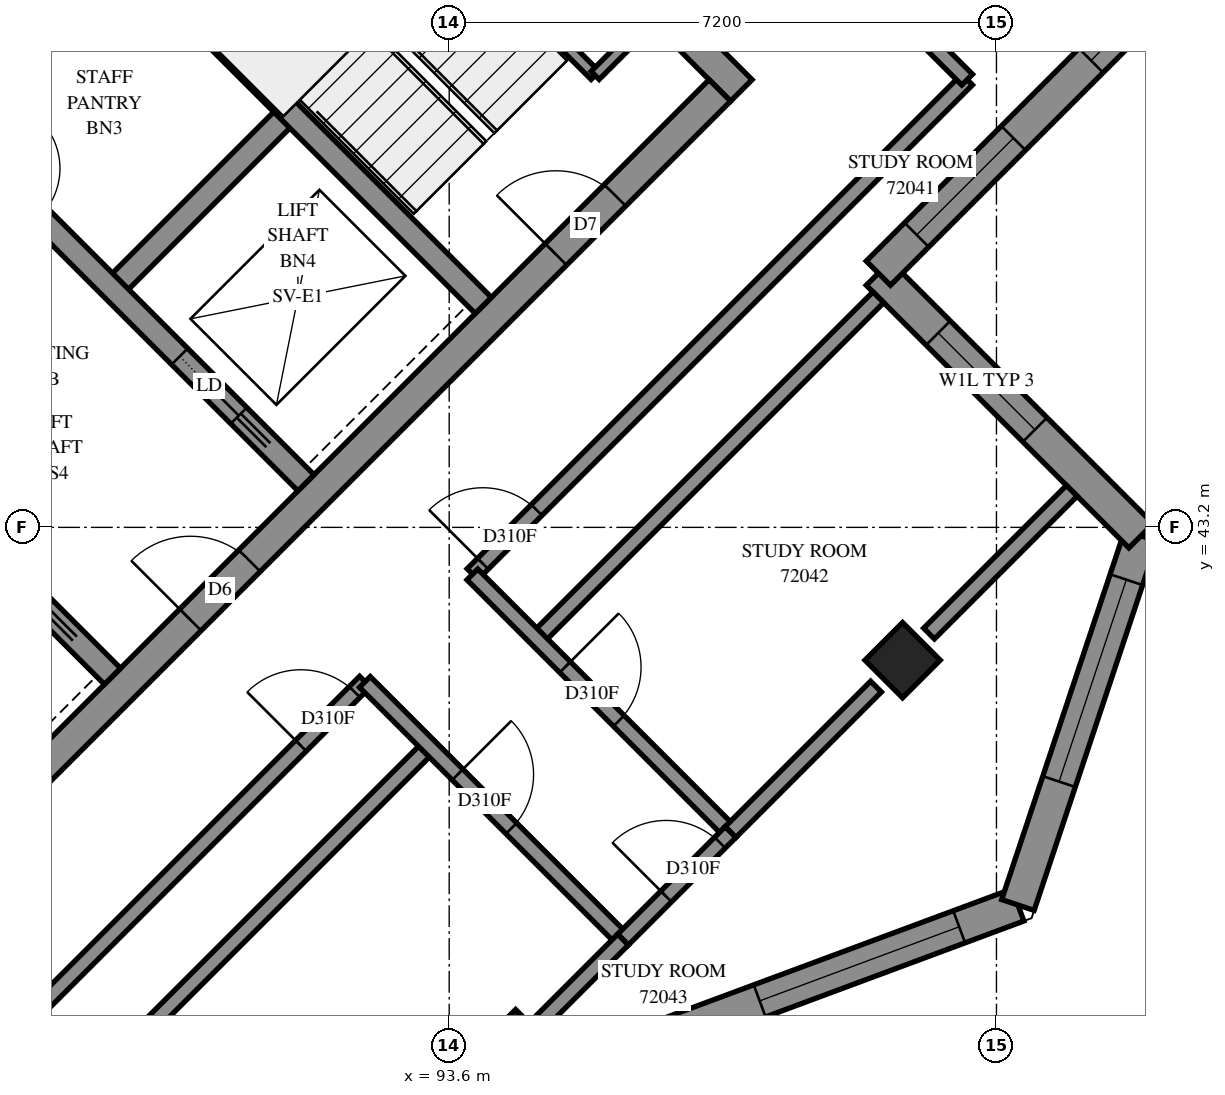
"""IFC4 building model, lengths in metres.
Left out: names, types, materials, properties, quantities, classifications, styles, units other than length and angle.
Written with IfcOpenShell. Run it as: python <this file> out.ifc"""

import sys

from ifc_helpers import new_model, si_unit, direction, frame, frame_2d, origin, origin_2d, place, context, subcontext, project, spatial, polyline, rectangle, outline, extrude, element, fill, save


model = new_model("IFC4")
c1 = context("Model", 3, precision=1e-05, world=origin(), true_north=direction((0.0, 1.0)))
c2 = subcontext(c1, "Body", "Model", "MODEL_VIEW")
j1 = project(units=[si_unit("LENGTHUNIT", "METRE"), si_unit("PLANEANGLEUNIT", "RADIAN")], contexts=[c1])
p1 = place(None, origin())
s1 = spatial("IfcSite", under=j1, at=p1, CompositionType="ELEMENT")
p2 = place(p1, origin())
s2 = spatial("IfcBuilding", under=s1, at=p2, CompositionType="ELEMENT")
p3 = place(p2, frame((0.0, 0.0, 264.2)))
s3 = spatial("IfcBuildingStorey", under=s2, at=p3, CompositionType="ELEMENT", Elevation=264.2)
for number, where, z_axis, x_axis in (
    (1, (99.565, 41.453, 0.0), (0.0, 0.0, 1.0), (0.707, -0.707, 0.0)),
    (2, (94.474, 36.362, 0.0), (0.0, 0.0, 1.0), (0.707, -0.707, 0.0)),
):
    element("IfcColumn", number, at=place(p3, frame(where, z_axis=z_axis, x_axis=x_axis)), inside=s3, PredefinedType="COLUMN", context=c2, shape_type="SweptSolid", body=[
        extrude(rectangle(XDim=0.7, YDim=0.7, at=origin_2d()), origin(), (0.0, 0.0, 1.0), 3.1),
    ])
p4 = place(p3, frame((86.695, 59.696, -0.3), z_axis=(0.0, 0.0, 1.0), x_axis=(0.7071100706, -0.7071034917, 0.0)))
e3 = element("IfcWall", 3, at=p4, inside=s3, PredefinedType="SHEAR", context=c2, shape_type="SweptSolid", body=[
    extrude(rectangle(XDim=15.2, YDim=0.4, at=frame_2d((7.6, 0.0))), origin(), (0.0, 0.0, 1.0), 2.7),
])
p5 = place(p4, frame((10.4, 0.0, 0.3)))
e4 = element("IfcOpeningElement", 4, at=p5, cuts=e3, PredefinedType="OPENING", context=c2, shape_type="SweptSolid", body=[
    extrude(rectangle(XDim=0.8, YDim=2.1, at=frame_2d((0.4, 1.05))), frame((0.0, 0.21, 0.0), z_axis=(0.0, -1.0, 0.0), x_axis=(1.0, 0.0, 0.0)), (0.0, 0.0, 1.0), 0.42),
])
p6 = place(p3, frame((86.978, 38.766, -0.3), z_axis=(0.0, 0.0, 1.0), x_axis=(0.7071067812, 0.7071067812, 0.0)))
e5 = element("IfcWall", 5, at=p6, inside=s3, PredefinedType="SHEAR", context=c2, shape_type="SweptSolid", body=[
    extrude(rectangle(XDim=14.4, YDim=0.4, at=frame_2d((7.2, 0.0))), origin(), (0.0, 0.0, 1.0), 2.7),
])
p7 = place(p6, frame((4.55, 0.0, 0.3)))
e6 = element("IfcOpeningElement", 6, at=p7, cuts=e5, PredefinedType="OPENING", context=c2, shape_type="SweptSolid", body=[
    extrude(rectangle(XDim=1.1, YDim=2.1, at=frame_2d((0.55, 1.05))), frame((0.0, 0.21, 0.0), z_axis=(0.0, -1.0, 0.0), x_axis=(1.0, 0.0, 0.0)), (0.0, 0.0, 1.0), 0.42),
])
p8 = place(p6, frame((11.35, 0.0, 0.3)))
e7 = element("IfcOpeningElement", 7, at=p8, cuts=e5, PredefinedType="OPENING", context=c2, shape_type="SweptSolid", body=[
    extrude(rectangle(XDim=1.1, YDim=2.1, at=frame_2d((0.55, 1.05))), frame((0.0, 0.21, 0.0), z_axis=(0.0, -1.0, 0.0), x_axis=(1.0, 0.0, 0.0)), (0.0, 0.0, 1.0), 0.42),
])
for number, where, z_axis, x_axis in (
    (8, (86.625, 48.878, 0.0), (0.0, 0.0, 1.0), (0.707, 0.707, 0.0)),
    (9, (89.17, 46.332, 0.0), (0.0, 0.0, 1.0), (0.707, 0.707, 0.0)),
):
    element("IfcWall", number, at=place(p3, frame(where, z_axis=z_axis, x_axis=x_axis)), inside=s3, PredefinedType="SOLIDWALL", context=c2, shape_type="SweptSolid", body=[
        extrude(rectangle(XDim=3.3, YDim=0.3, at=frame_2d((1.65, 0.0))), origin(), (0.0, 0.0, 1.0), 3.1),
    ])
p9 = place(p3, frame((78.988, 51.423, 0.0), z_axis=(0.0, 0.0, 1.0), x_axis=(0.7071067812, -0.7071067812, 0.0)))
e10 = element("IfcWall", 10, at=p9, inside=s3, PredefinedType="SOLIDWALL", context=c2, shape_type="SweptSolid", body=[
    extrude(rectangle(XDim=14.4, YDim=0.3, at=frame_2d((7.2, 0.0))), origin(), (0.0, 0.0, 1.0), 3.1),
])
p10 = place(p9, frame((1.35, 0.0, 0.0)))
e11 = element("IfcOpeningElement", 11, at=p10, cuts=e10, PredefinedType="OPENING", context=c2, shape_type="SweptSolid", body=[
    extrude(rectangle(XDim=0.9, YDim=2.1, at=frame_2d((0.45, 1.05))), frame((0.0, 0.16, 0.0), z_axis=(0.0, -1.0, 0.0), x_axis=(1.0, 0.0, 0.0)), (0.0, 0.0, 1.0), 0.32),
])
p11 = place(p9, frame((4.95, 0.0, 0.0)))
e12 = element("IfcOpeningElement", 12, at=p11, cuts=e10, PredefinedType="OPENING", context=c2, shape_type="SweptSolid", body=[
    extrude(rectangle(XDim=0.9, YDim=2.1, at=frame_2d((0.45, 1.05))), frame((0.0, 0.16, 0.0), z_axis=(0.0, -1.0, 0.0), x_axis=(1.0, 0.0, 0.0)), (0.0, 0.0, 1.0), 0.32),
])
p12 = place(p9, frame((8.55, 0.0, 0.0)))
e13 = element("IfcOpeningElement", 13, at=p12, cuts=e10, PredefinedType="OPENING", context=c2, shape_type="SweptSolid", body=[
    extrude(rectangle(XDim=0.9, YDim=2.1, at=frame_2d((0.45, 1.05))), frame((0.0, 0.16, 0.0), z_axis=(0.0, -1.0, 0.0), x_axis=(1.0, 0.0, 0.0)), (0.0, 0.0, 1.0), 0.32),
])
p13 = place(p9, frame((12.05, 0.0, 0.0)))
e14 = element("IfcOpeningElement", 14, at=p13, cuts=e10, PredefinedType="OPENING", context=c2, shape_type="SweptSolid", body=[
    extrude(rectangle(XDim=1.1, YDim=2.1, at=frame_2d((0.55, 1.05))), frame((0.0, 0.16, 0.0), z_axis=(0.0, -1.0, 0.0), x_axis=(1.0, 0.0, 0.0)), (0.0, 0.0, 1.0), 0.32),
])
p14 = place(p3, frame((81.534, 53.969, 0.0), z_axis=(0.0, 0.0, 1.0), x_axis=(0.707103309, -0.7071102534, 0.0)))
e15 = element("IfcWall", 15, at=p14, inside=s3, PredefinedType="SOLIDWALL", context=c2, shape_type="SweptSolid", body=[
    extrude(rectangle(XDim=14.4, YDim=0.3, at=frame_2d((7.2, 0.0))), origin(), (0.0, 0.0, 1.0), 3.1),
])
p15 = place(p14, frame((8.55, 0.0, 0.0)))
e16 = element("IfcOpeningElement", 16, at=p15, cuts=e15, PredefinedType="OPENING", context=c2, shape_type="SweptSolid", body=[
    extrude(rectangle(XDim=0.9, YDim=2.1, at=frame_2d((0.45, 1.05))), frame((0.0, 0.16, 0.0), z_axis=(0.0, -1.0, 0.0), x_axis=(1.0, 0.0, 0.0)), (0.0, 0.0, 1.0), 0.32),
])
p16 = place(p14, frame((1.25, 0.0, 0.0)))
e17 = element("IfcOpeningElement", 17, at=p16, cuts=e15, PredefinedType="OPENING", context=c2, shape_type="SweptSolid", body=[
    extrude(rectangle(XDim=1.1, YDim=2.1, at=frame_2d((0.55, 1.05))), frame((0.0, 0.16, 0.0), z_axis=(0.0, -1.0, 0.0), x_axis=(1.0, 0.0, 0.0)), (0.0, 0.0, 1.0), 0.32),
])
p17 = place(p14, frame((4.85, 0.0, 0.0)))
e18 = element("IfcOpeningElement", 18, at=p17, cuts=e15, PredefinedType="OPENING", context=c2, shape_type="SweptSolid", body=[
    extrude(rectangle(XDim=1.1, YDim=2.1, at=frame_2d((0.55, 1.05))), frame((0.0, 0.16, 0.0), z_axis=(0.0, -1.0, 0.0), x_axis=(1.0, 0.0, 0.0)), (0.0, 0.0, 1.0), 0.32),
])
p18 = place(p14, frame((12.05, 0.0, 0.0)))
e19 = element("IfcOpeningElement", 19, at=p18, cuts=e15, PredefinedType="OPENING", context=c2, shape_type="SweptSolid", body=[
    extrude(rectangle(XDim=1.1, YDim=2.1, at=frame_2d((0.55, 1.05))), frame((0.0, 0.16, 0.0), z_axis=(0.0, -1.0, 0.0), x_axis=(1.0, 0.0, 0.0)), (0.0, 0.0, 1.0), 0.32),
])
p19 = place(p3, frame((88.958, 51.211, 0.0), z_axis=(0.0, 0.0, 1.0), x_axis=(0.7070998367, -0.7071137256, 0.0)))
e20 = element("IfcWall", 20, at=p19, inside=s3, PredefinedType="SOLIDWALL", context=c2, shape_type="SweptSolid", body=[
    extrude(rectangle(XDim=7.2, YDim=0.3, at=frame_2d((3.6, 0.0))), origin(), (0.0, 0.0, 1.0), 3.1),
])
p20 = place(p3, frame((96.137, 36.395, 0.0), z_axis=(0.0, 0.0, 1.0), x_axis=(0.937429161, 0.3481760591, 0.0)))
e21 = element("IfcWall", 21, at=p20, inside=s3, PredefinedType="SOLIDWALL", context=c2, shape_type="SweptSolid", body=[
    extrude(outline(polyline([(0.103, -0.225), (5.383, -0.225), (5.168, 0.225), (-0.103, 0.225), (0.103, -0.225)])), origin(), (0.0, 0.0, 1.0), 3.1),
])
p21 = place(p20, frame((1.651, 0.0, 0.45)))
e22 = element("IfcOpeningElement", 22, at=p21, cuts=e21, PredefinedType="OPENING", context=c2, shape_type="SweptSolid", body=[
    extrude(rectangle(XDim=2.8, YDim=2.55, at=frame_2d((1.4, 1.275))), frame((0.0, 0.235, 0.0), z_axis=(0.0, -1.0, 0.0), x_axis=(1.0, 0.0, 0.0)), (0.0, 0.0, 1.0), 0.47),
])
p22 = place(p3, frame((101.082, 38.232, 0.0), z_axis=(0.0, 0.0, 1.0), x_axis=(0.316227766, 0.9486832981, 0.0)))
e23 = element("IfcWall", 23, at=p22, inside=s3, PredefinedType="SOLIDWALL", context=c2, shape_type="SweptSolid", body=[
    extrude(outline(polyline([(-0.108, -0.225), (5.259, -0.225), (4.981, 0.225), (0.108, 0.225), (-0.108, -0.225)])), origin(), (0.0, 0.0, 1.0), 3.1),
])
p23 = place(p22, frame((1.711, 0.0, 0.45)))
e24 = element("IfcOpeningElement", 24, at=p23, cuts=e23, PredefinedType="OPENING", context=c2, shape_type="SweptSolid", body=[
    extrude(rectangle(XDim=2.8, YDim=2.55, at=frame_2d((1.4, 1.275))), frame((0.0, 0.235, 0.0), z_axis=(0.0, -1.0, 0.0), x_axis=(1.0, 0.0, 0.0)), (0.0, 0.0, 1.0), 0.47),
])
p24 = place(p3, frame((102.701, 43.089, 0.0), z_axis=(0.0, 0.0, 1.0), x_axis=(-0.7070965479, 0.7071170144, 0.0)))
e25 = element("IfcWall", 25, at=p24, inside=s3, PredefinedType="SOLIDWALL", context=c2, shape_type="SweptSolid", body=[
    extrude(outline(polyline([(-0.139, -0.225), (4.661, -0.225), (5.111, 0.225), (0.139, 0.225), (-0.139, -0.225)])), origin(), (0.0, 0.0, 1.0), 3.1),
])
p25 = place(p24, frame((1.974, 0.0, 0.6)))
e26 = element("IfcOpeningElement", 26, at=p25, cuts=e25, PredefinedType="OPENING", context=c2, shape_type="SweptSolid", body=[
    extrude(rectangle(XDim=1.8, YDim=1.9, at=frame_2d((0.9, 0.95))), frame((0.0, 0.235, 0.0), z_axis=(0.0, -1.0, 0.0), x_axis=(1.0, 0.0, 0.0)), (0.0, 0.0, 1.0), 0.47),
])
p26 = place(p3, frame((99.246, 46.544, 0.0), z_axis=(0.0, 0.0, 1.0), x_axis=(0.7071067812, 0.7071067812, 0.0)))
e27 = element("IfcWall", 27, at=p26, inside=s3, PredefinedType="SOLIDWALL", context=c2, shape_type="SweptSolid", body=[
    extrude(outline(polyline([(0.225, -0.225), (6.107, -0.225), (5.488, 0.225), (-0.225, 0.225), (0.225, -0.225)])), origin(), (0.0, 0.0, 1.0), 3.1),
])
p27 = place(p26, frame((0.713, 0.0, 0.6)))
e28 = element("IfcOpeningElement", 28, at=p27, cuts=e27, PredefinedType="OPENING", context=c2, shape_type="SweptSolid", body=[
    extrude(rectangle(XDim=1.8, YDim=1.9, at=frame_2d((0.9, 0.95))), frame((0.0, 0.235, 0.0), z_axis=(0.0, -1.0, 0.0), x_axis=(1.0, 0.0, 0.0)), (0.0, 0.0, 1.0), 0.47),
])
p28 = place(p26, frame((3.956, 0.0, 0.6)))
e29 = element("IfcOpeningElement", 29, at=p28, cuts=e27, PredefinedType="OPENING", context=c2, shape_type="SweptSolid", body=[
    extrude(rectangle(XDim=1.2, YDim=1.9, at=frame_2d((0.6, 0.95))), frame((0.0, 0.235, 0.0), z_axis=(0.0, -1.0, 0.0), x_axis=(1.0, 0.0, 0.0)), (0.0, 0.0, 1.0), 0.47),
])
p29 = place(p3, frame((91.313, 53.354, 0.0), z_axis=(0.0, 0.0, 1.0), x_axis=(0.7071067812, -0.7071067812, 0.0)))
e30 = element("IfcWall", 30, at=p29, inside=s3, PredefinedType="PARTITIONING", context=c2, shape_type="SweptSolid", body=[
    extrude(rectangle(XDim=5.95, YDim=0.15, at=frame_2d((2.975, 0.0))), origin(), (0.0, 0.0, 1.0), 3.1),
])
p30 = place(p3, frame((95.52, 49.146, 0.0), z_axis=(0.0, 0.0, 1.0), x_axis=(0.7071067812, 0.7071067812, 0.0)))
e31 = element("IfcWall", 31, at=p30, inside=s3, PredefinedType="PARTITIONING", context=c2, shape_type="SweptSolid", body=[
    extrude(rectangle(XDim=1.02, YDim=0.15, at=frame_2d((0.51, 0.0))), origin(), (0.0, 0.0, 1.0), 3.1),
])
p31 = place(p3, frame((84.96, 31.941, 0.0), z_axis=(0.0, 0.0, 1.0), x_axis=(0.707102563, 0.7071109994, 0.0)))
e32 = element("IfcWall", 32, at=p31, inside=s3, PredefinedType="PARTITIONING", context=c2, shape_type="SweptSolid", body=[
    extrude(rectangle(XDim=11.853, YDim=0.2, at=frame_2d((5.927, 0.0))), origin(), (0.0, 0.0, 1.0), 3.1),
])
p32 = place(p3, frame((93.907, 42.585, 0.0), z_axis=(0.0, 0.0, 1.0), x_axis=(0.7071067812, 0.7071067812, 0.0)))
e33 = element("IfcWall", 33, at=p32, inside=s3, PredefinedType="PARTITIONING", context=c2, shape_type="SweptSolid", body=[
    extrude(rectangle(XDim=9.201, YDim=0.2, at=frame_2d((4.601, 0.0))), origin(), (0.0, 0.0, 1.0), 3.1),
])
p33 = place(p32, frame((0.193, 0.0, 0.0)))
e34 = element("IfcOpeningElement", 34, at=p33, cuts=e33, PredefinedType="OPENING", context=c2, shape_type="SweptSolid", body=[
    extrude(rectangle(XDim=1.0, YDim=2.1, at=frame_2d((0.5, 1.05))), frame((0.0, 0.11, 0.0), z_axis=(0.0, -1.0, 0.0), x_axis=(1.0, 0.0, 0.0)), (0.0, 0.0, 1.0), 0.22),
])
p34 = place(p3, frame((86.836, 35.514, 0.0), z_axis=(0.0, 0.0, 1.0), x_axis=(0.7071067812, 0.7071067812, 0.0)))
e35 = element("IfcWall", 35, at=p34, inside=s3, PredefinedType="PARTITIONING", context=c2, shape_type="SweptSolid", body=[
    extrude(rectangle(XDim=7.999, YDim=0.2, at=frame_2d((3.999, 0.0))), origin(), (0.0, 0.0, 1.0), 3.1),
])
p35 = place(p34, frame((6.807, 0.0, 0.0)))
e36 = element("IfcOpeningElement", 36, at=p35, cuts=e35, PredefinedType="OPENING", context=c2, shape_type="SweptSolid", body=[
    extrude(rectangle(XDim=1.0, YDim=2.1, at=frame_2d((0.5, 1.05))), frame((0.0, 0.11, 0.0), z_axis=(0.0, -1.0, 0.0), x_axis=(1.0, 0.0, 0.0)), (0.0, 0.0, 1.0), 0.22),
])
p36 = place(p3, frame((94.755, 41.737, 0.0), z_axis=(0.0, 0.0, 1.0), x_axis=(0.7071146549, 0.7070989073, 0.0)))
e37 = element("IfcWall", 37, at=p36, inside=s3, PredefinedType="PARTITIONING", context=c2, shape_type="SweptSolid", body=[
    extrude(rectangle(XDim=6.35, YDim=0.2, at=frame_2d((3.175, 0.0))), origin(), (0.0, 0.0, 1.0), 3.1),
])
p37 = place(p3, frame((93.905, 42.581, 0.0), z_axis=(0.0, 0.0, 1.0), x_axis=(0.7071067812, -0.7071067812, 0.0)))
e38 = element("IfcWall", 38, at=p37, inside=s3, PredefinedType="PARTITIONING", context=c2, shape_type="SweptSolid", body=[
    extrude(rectangle(XDim=4.8, YDim=0.2, at=frame_2d((2.4, 0.0))), origin(), (0.0, 0.0, 1.0), 3.1),
])
p38 = place(p37, frame((1.725, 0.0, 0.0)))
e39 = element("IfcOpeningElement", 39, at=p38, cuts=e38, PredefinedType="OPENING", context=c2, shape_type="SweptSolid", body=[
    extrude(rectangle(XDim=1.0, YDim=2.1, at=frame_2d((0.5, 1.05))), frame((0.0, 0.11, 0.0), z_axis=(0.0, -1.0, 0.0), x_axis=(1.0, 0.0, 0.0)), (0.0, 0.0, 1.0), 0.22),
])
p39 = place(p3, frame((92.491, 41.167, 0.0), z_axis=(0.0, 0.0, 1.0), x_axis=(0.7071067812, -0.7071067812, 0.0)))
e40 = element("IfcWall", 40, at=p39, inside=s3, PredefinedType="PARTITIONING", context=c2, shape_type="SweptSolid", body=[
    extrude(rectangle(XDim=4.8, YDim=0.2, at=frame_2d((2.4, 0.0))), origin(), (0.0, 0.0, 1.0), 3.1),
])
p40 = place(p39, frame((1.725, 0.0, 0.0)))
e41 = element("IfcOpeningElement", 41, at=p40, cuts=e40, PredefinedType="OPENING", context=c2, shape_type="SweptSolid", body=[
    extrude(rectangle(XDim=1.0, YDim=2.1, at=frame_2d((0.5, 1.05))), frame((0.0, 0.11, 0.0), z_axis=(0.0, -1.0, 0.0), x_axis=(1.0, 0.0, 0.0)), (0.0, 0.0, 1.0), 0.22),
])
p41 = place(p3, frame((97.301, 39.191, 0.0), z_axis=(0.0, 0.0, 1.0), x_axis=(0.7071067812, 0.7071067812, 0.0)))
e42 = element("IfcWall", 42, at=p41, inside=s3, PredefinedType="PARTITIONING", context=c2, shape_type="SweptSolid", body=[
    extrude(rectangle(XDim=2.707, YDim=0.2, at=frame_2d((1.353, 0.0))), origin(), (0.0, 0.0, 1.0), 2.6),
])
p42 = place(p3, frame((99.913, 41.803, 0.0), z_axis=(0.0, 0.0, 1.0), x_axis=(0.7071067812, 0.7071067812, 0.0)))
e43 = element("IfcWall", 43, at=p42, inside=s3, PredefinedType="PARTITIONING", context=c2, shape_type="SweptSolid", body=[
    extrude(rectangle(XDim=2.656, YDim=0.2, at=frame_2d((1.328, 0.0))), origin(), (0.0, 0.0, 1.0), 3.1),
])
p43 = place(p3, frame((98.998, 50.504, 0.0), z_axis=(0.0, 0.0, 1.0), x_axis=(0.7076063266, -0.7066068826, 0.0)))
e44 = element("IfcWall", 44, at=p43, inside=s3, PredefinedType="PARTITIONING", context=c2, shape_type="SweptSolid", body=[
    extrude(rectangle(XDim=2.001, YDim=0.2, at=frame_2d((1.001, 0.0))), origin(), (0.0, 0.0, 1.0), 3.1),
])
p44 = place(p3, frame((95.887, 37.777, 0.0), z_axis=(0.0, 0.0, 1.0), x_axis=(0.7071067812, 0.7071067812, 0.0)))
e45 = element("IfcWall", 45, at=p44, inside=s3, PredefinedType="PARTITIONING", context=c2, shape_type="SweptSolid", body=[
    extrude(rectangle(XDim=2.0, YDim=0.2, at=frame_2d((1.0, 0.0))), origin(), (0.0, 0.0, 1.0), 2.6),
])
p45 = place(p44, frame((0.803, 0.0, 0.0)))
e46 = element("IfcOpeningElement", 46, at=p45, cuts=e45, PredefinedType="OPENING", context=c2, shape_type="SweptSolid", body=[
    extrude(rectangle(XDim=1.0, YDim=2.1, at=frame_2d((0.5, 1.05))), frame((0.0, 0.11, 0.0), z_axis=(0.0, -1.0, 0.0), x_axis=(1.0, 0.0, 0.0)), (0.0, 0.0, 1.0), 0.22),
])
p46 = place(p3, frame((94.823, 36.713, 0.0), z_axis=(0.0, 0.0, 1.0), x_axis=(0.7071067812, 0.7071067812, 0.0)))
e47 = element("IfcWall", 47, at=p46, inside=s3, PredefinedType="PARTITIONING", context=c2, shape_type="SweptSolid", body=[
    extrude(rectangle(XDim=1.505, YDim=0.2, at=frame_2d((0.752, 0.0))), origin(), (0.0, 0.0, 1.0), 2.6),
])
p47 = place(p21, origin())
e48 = element("IfcWindow", 48, at=p47, inside=s3, PartitioningType="SINGLE_PANEL", PredefinedType="WINDOW", context=c2, shape_type="SweptSolid", body=[
    extrude(rectangle(XDim=2.8, YDim=2.55, at=frame_2d((1.4, 1.275))), frame((0.0, 0.205, 0.0), z_axis=(0.0, -1.0, 0.0), x_axis=(1.0, 0.0, 0.0)), (0.0, 0.0, 1.0), 0.06),
])
fill(e22, e48)
p48 = place(p23, origin())
e49 = element("IfcWindow", 49, at=p48, inside=s3, PartitioningType="SINGLE_PANEL", PredefinedType="WINDOW", context=c2, shape_type="SweptSolid", body=[
    extrude(rectangle(XDim=2.8, YDim=2.55, at=frame_2d((1.4, 1.275))), frame((0.0, 0.205, 0.0), z_axis=(0.0, -1.0, 0.0), x_axis=(1.0, 0.0, 0.0)), (0.0, 0.0, 1.0), 0.06),
])
fill(e24, e49)
p49 = place(p25, origin())
e50 = element("IfcWindow", 50, at=p49, inside=s3, PartitioningType="SINGLE_PANEL", PredefinedType="WINDOW", context=c2, shape_type="SweptSolid", body=[
    extrude(rectangle(XDim=1.8, YDim=1.9, at=frame_2d((0.9, 0.95))), frame((0.0, 0.205, 0.0), z_axis=(0.0, -1.0, 0.0), x_axis=(1.0, 0.0, 0.0)), (0.0, 0.0, 1.0), 0.06),
])
fill(e26, e50)
p50 = place(p27, origin())
e51 = element("IfcWindow", 51, at=p50, inside=s3, PartitioningType="SINGLE_PANEL", PredefinedType="WINDOW", context=c2, shape_type="SweptSolid", body=[
    extrude(rectangle(XDim=1.8, YDim=1.9, at=frame_2d((0.9, 0.95))), frame((0.0, 0.205, 0.0), z_axis=(0.0, -1.0, 0.0), x_axis=(1.0, 0.0, 0.0)), (0.0, 0.0, 1.0), 0.06),
])
fill(e28, e51)
p51 = place(p28, origin())
e52 = element("IfcWindow", 52, at=p51, inside=s3, PartitioningType="SINGLE_PANEL", PredefinedType="WINDOW", context=c2, shape_type="SweptSolid", body=[
    extrude(rectangle(XDim=1.2, YDim=1.9, at=frame_2d((0.6, 0.95))), frame((0.0, 0.205, 0.0), z_axis=(0.0, -1.0, 0.0), x_axis=(1.0, 0.0, 0.0)), (0.0, 0.0, 1.0), 0.06),
])
fill(e29, e52)
p52 = place(p7, origin())
e53 = element("IfcDoor", 53, at=p52, inside=s3, OperationType="DOUBLE_DOOR_SINGLE_SWING", PredefinedType="DOOR", context=c2, shape_type="SweptSolid", body=[
    extrude(rectangle(XDim=1.1, YDim=2.1, at=frame_2d((0.55, 1.05))), frame((0.0, 0.025, 0.0), z_axis=(0.0, -1.0, 0.0), x_axis=(1.0, 0.0, 0.0)), (0.0, 0.0, 1.0), 0.05),
])
fill(e6, e53)
p53 = place(p8, origin())
e54 = element("IfcDoor", 54, at=p53, inside=s3, OperationType="SINGLE_SWING_RIGHT", PredefinedType="DOOR", context=c2, shape_type="SweptSolid", body=[
    extrude(rectangle(XDim=1.1, YDim=2.1, at=frame_2d((0.55, 1.05))), frame((0.0, 0.025, 0.0), z_axis=(0.0, -1.0, 0.0), x_axis=(1.0, 0.0, 0.0)), (0.0, 0.0, 1.0), 0.05),
])
fill(e7, e54)
p54 = place(p18, origin())
e55 = element("IfcDoor", 55, at=p54, inside=s3, OperationType="SLIDING_TO_RIGHT", PredefinedType="DOOR", context=c2, shape_type="SweptSolid", body=[
    extrude(rectangle(XDim=1.1, YDim=2.1, at=frame_2d((0.55, 1.05))), frame((0.0, 0.025, 0.0), z_axis=(0.0, -1.0, 0.0), x_axis=(1.0, 0.0, 0.0)), (0.0, 0.0, 1.0), 0.05),
])
fill(e19, e55)
p55 = place(p35, origin())
e56 = element("IfcDoor", 56, at=p55, inside=s3, OperationType="SINGLE_SWING_RIGHT", PredefinedType="DOOR", context=c2, shape_type="SweptSolid", body=[
    extrude(rectangle(XDim=1.0, YDim=2.1, at=frame_2d((0.5, 1.05))), frame((0.0, 0.025, 0.0), z_axis=(0.0, -1.0, 0.0), x_axis=(1.0, 0.0, 0.0)), (0.0, 0.0, 1.0), 0.05),
])
fill(e36, e56)
p56 = place(p40, origin())
e57 = element("IfcDoor", 57, at=p56, inside=s3, OperationType="SINGLE_SWING_LEFT", PredefinedType="DOOR", context=c2, shape_type="SweptSolid", body=[
    extrude(rectangle(XDim=1.0, YDim=2.1, at=frame_2d((0.5, 1.05))), frame((0.0, 0.025, 0.0), z_axis=(0.0, -1.0, 0.0), x_axis=(1.0, 0.0, 0.0)), (0.0, 0.0, 1.0), 0.05),
])
fill(e41, e57)
p57 = place(p33, origin())
e58 = element("IfcDoor", 58, at=p57, inside=s3, OperationType="SINGLE_SWING_LEFT", PredefinedType="DOOR", context=c2, shape_type="SweptSolid", body=[
    extrude(rectangle(XDim=1.0, YDim=2.1, at=frame_2d((0.5, 1.05))), frame((0.0, 0.025, 0.0), z_axis=(0.0, -1.0, 0.0), x_axis=(1.0, 0.0, 0.0)), (0.0, 0.0, 1.0), 0.05),
])
fill(e34, e58)
p58 = place(p38, origin())
e59 = element("IfcDoor", 59, at=p58, inside=s3, OperationType="SINGLE_SWING_RIGHT", PredefinedType="DOOR", context=c2, shape_type="SweptSolid", body=[
    extrude(rectangle(XDim=1.0, YDim=2.1, at=frame_2d((0.5, 1.05))), frame((0.0, 0.025, 0.0), z_axis=(0.0, -1.0, 0.0), x_axis=(1.0, 0.0, 0.0)), (0.0, 0.0, 1.0), 0.05),
])
fill(e39, e59)
p59 = place(p45, origin())
e60 = element("IfcDoor", 60, at=p59, inside=s3, OperationType="SINGLE_SWING_RIGHT", PredefinedType="DOOR", context=c2, shape_type="SweptSolid", body=[
    extrude(rectangle(XDim=1.0, YDim=2.1, at=frame_2d((0.5, 1.05))), frame((0.0, 0.025, 0.0), z_axis=(0.0, -1.0, 0.0), x_axis=(1.0, 0.0, 0.0)), (0.0, 0.0, 1.0), 0.05),
])
fill(e46, e60)
save(model, sys.argv[1])
